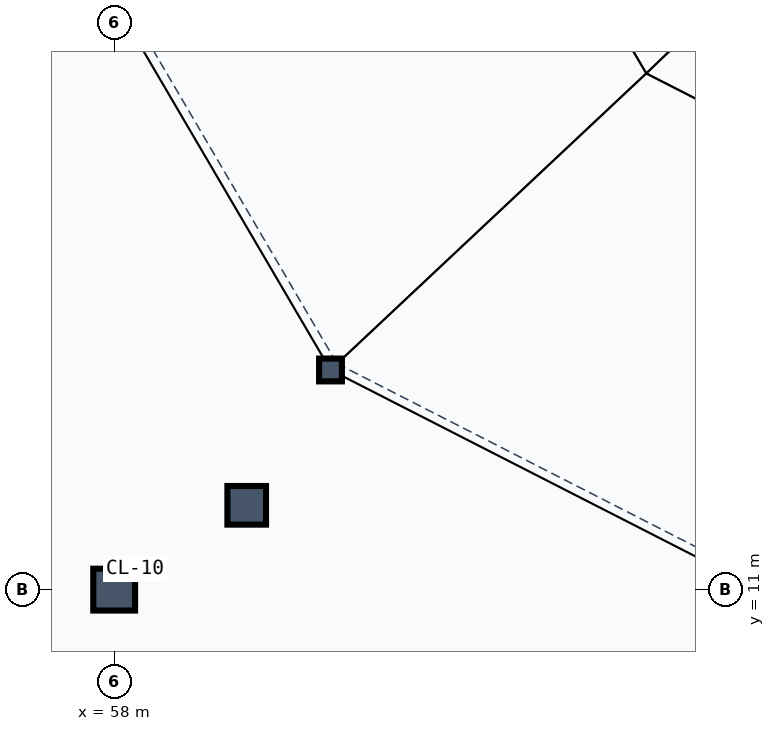
"""IFC4 building model, lengths in metres.
Left out: names, types, materials, properties, quantities, classifications, styles, units other than length and angle.
Written with IfcOpenShell. Run it as: python <this file> out.ifc"""

import sys

from ifc_helpers import new_model, si_unit, direction, frame, origin, origin_2d, place, context, subcontext, project, spatial, rectangle, hollow_rectangle, hollow_circle, extrude, element, save


model = new_model("IFC4")
c1 = context("Model", 3, precision=1e-05, world=origin(), true_north=direction((0.0, 1.0)))
c2 = subcontext(c1, "Body", "Model", "MODEL_VIEW")
j1 = project(units=[si_unit("LENGTHUNIT", "METRE"), si_unit("PLANEANGLEUNIT", "RADIAN")], contexts=[c1])
p1 = place(None, origin())
s1 = spatial("IfcSite", under=j1, at=p1, CompositionType="ELEMENT")
p2 = place(p1, origin())
s2 = spatial("IfcBuilding", under=s1, at=p2, CompositionType="ELEMENT")
p3 = place(p2, frame((0.0, 0.0, 14.7)))
s3 = spatial("IfcBuildingStorey", under=s2, at=p3, CompositionType="ELEMENT", Elevation=14.7)
p4 = place(p3, frame((58.0, 11.0, 0.0), z_axis=(0.0, 0.0, 1.0), x_axis=(1.0, 0.0, 0.0)))
e1 = element("IfcColumn", 1, at=p4, inside=s3, PredefinedType="COLUMN", context=c2, shape_type="SweptSolid", body=[
    extrude(rectangle(XDim=0.55, YDim=0.55, at=origin_2d()), origin(), (0.0, 0.0, 1.0), 4.8),
])
p5 = place(p3, frame((59.744, 12.109, 0.0), z_axis=(0.0, 0.0, 1.0), x_axis=(1.0, 0.0, 0.0)))
e2 = element("IfcColumn", 2, at=p5, inside=s3, PredefinedType="COLUMN", context=c2, shape_type="SweptSolid", body=[
    extrude(hollow_circle(Radius=0.254, WallThickness=0.02, at=origin_2d()), origin(), (0.0, 0.0, 1.0), 4.8),
])
p6 = place(p3, frame((60.846, 13.89, 0.0), z_axis=(0.0, 0.0, 1.0), x_axis=(1.0, 0.0, 0.0)))
e3 = element("IfcColumn", 3, at=p6, inside=s3, PredefinedType="COLUMN", context=c2, shape_type="SweptSolid", body=[
    extrude(hollow_rectangle(XDim=0.3, YDim=0.3, WallThickness=0.016, at=origin_2d()), origin(), (0.0, 0.0, 1.0), 1.22),
])
save(model, sys.argv[1])
